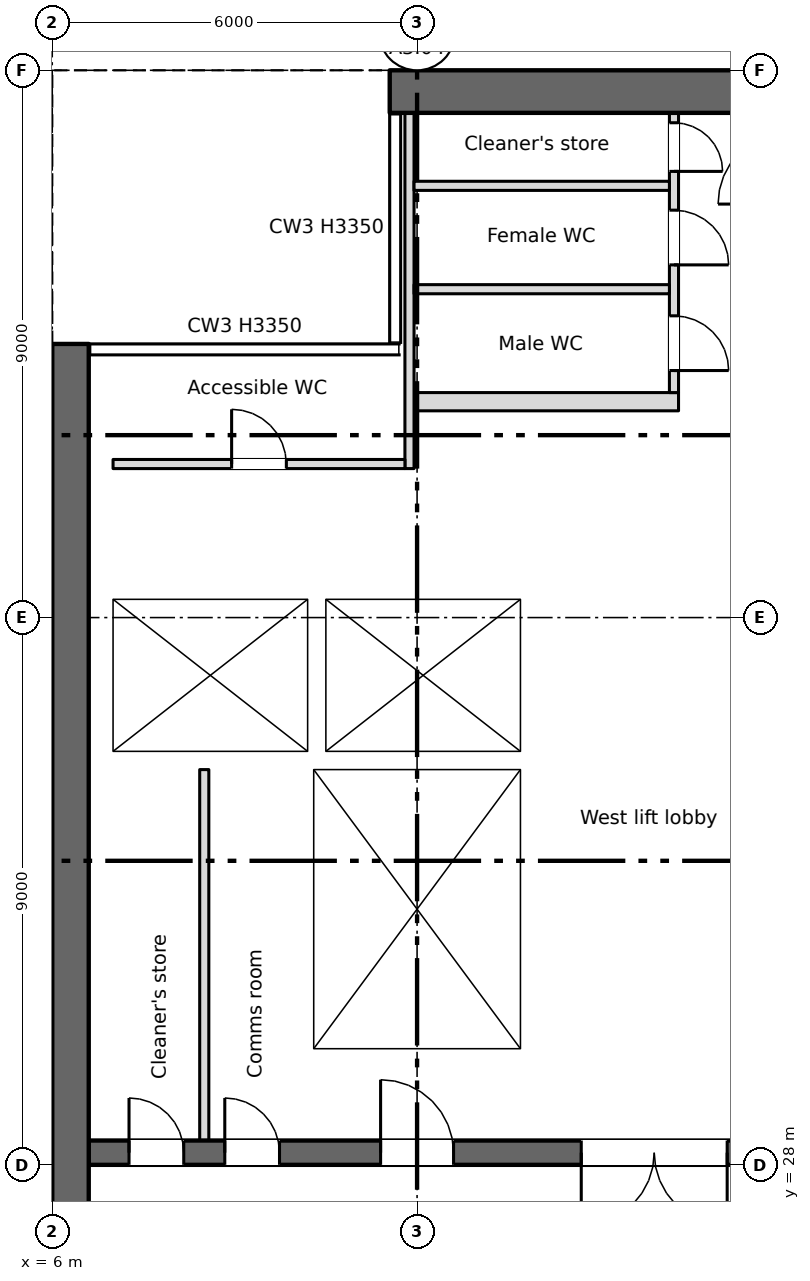
"""IFC4 building model, lengths in metres.
Left out: names, types, materials, properties, quantities, classifications, styles, units other than length and angle.
Written with IfcOpenShell. Run it as: python <this file> out.ifc"""

import sys

from ifc_helpers import new_model, si_unit, direction, frame, frame_2d, origin, place, context, subcontext, project, spatial, rectangle, extrude, element, fill, save


model = new_model("IFC4")
c1 = context("Model", 3, precision=1e-05, world=origin(), true_north=direction((0.0, 1.0)))
c2 = subcontext(c1, "Body", "Model", "MODEL_VIEW")
j1 = project(units=[si_unit("LENGTHUNIT", "METRE"), si_unit("PLANEANGLEUNIT", "RADIAN")], contexts=[c1])
p1 = place(None, origin())
s1 = spatial("IfcSite", under=j1, at=p1, CompositionType="ELEMENT")
p2 = place(p1, origin())
s2 = spatial("IfcBuilding", under=s1, at=p2, CompositionType="ELEMENT")
p3 = place(p2, frame((0.0, 0.0, 208.0)))
s3 = spatial("IfcBuildingStorey", under=s2, at=p3, CompositionType="ELEMENT", Elevation=208.0)
p4 = place(p3, frame((6.3, 7.5, 0.0), z_axis=(0.0, 0.0, 1.0), x_axis=(0.0, 1.0, 0.0)))
e1 = element("IfcWall", 1, at=p4, inside=s3, PredefinedType="SHEAR", context=c2, shape_type="SweptSolid", body=[
    extrude(rectangle(XDim=34.0, YDim=0.6, at=frame_2d((17.0, 0.0))), origin(), (0.0, 0.0, 1.0), 3.35),
])
p5 = place(p4, frame((1.2, 0.0, 0.6)))
e2 = element("IfcOpeningElement", 2, at=p5, cuts=e1, PredefinedType="OPENING", context=c2, shape_type="SweptSolid", body=[
    extrude(rectangle(XDim=0.6, YDim=2.4, at=frame_2d((0.3, 1.2))), frame((0.0, 0.31, 0.0), z_axis=(0.0, -1.0, 0.0), x_axis=(1.0, 0.0, 0.0)), (0.0, 0.0, 1.0), 0.62),
])
p6 = place(p4, frame((7.2, 0.0, 0.6)))
e3 = element("IfcOpeningElement", 3, at=p6, cuts=e1, PredefinedType="OPENING", context=c2, shape_type="SweptSolid", body=[
    extrude(rectangle(XDim=0.6, YDim=2.4, at=frame_2d((0.3, 1.2))), frame((0.0, 0.31, 0.0), z_axis=(0.0, -1.0, 0.0), x_axis=(1.0, 0.0, 0.0)), (0.0, 0.0, 1.0), 0.62),
])
p7 = place(p4, frame((13.2, 0.0, 0.6)))
e4 = element("IfcOpeningElement", 4, at=p7, cuts=e1, PredefinedType="OPENING", context=c2, shape_type="SweptSolid", body=[
    extrude(rectangle(XDim=0.6, YDim=2.4, at=frame_2d((0.3, 1.2))), frame((0.0, 0.31, 0.0), z_axis=(0.0, -1.0, 0.0), x_axis=(1.0, 0.0, 0.0)), (0.0, 0.0, 1.0), 0.62),
])
p8 = place(p4, frame((19.2, 0.0, 0.6)))
e5 = element("IfcOpeningElement", 5, at=p8, cuts=e1, PredefinedType="OPENING", context=c2, shape_type="SweptSolid", body=[
    extrude(rectangle(XDim=0.6, YDim=2.4, at=frame_2d((0.3, 1.2))), frame((0.0, 0.31, 0.0), z_axis=(0.0, -1.0, 0.0), x_axis=(1.0, 0.0, 0.0)), (0.0, 0.0, 1.0), 0.62),
])
p9 = place(p3, frame((11.55, 45.65, 0.0), z_axis=(0.0, 0.0, 1.0), x_axis=(1.0, 0.0, 0.0)))
e6 = element("IfcWall", 6, at=p9, inside=s3, PredefinedType="SHEAR", context=c2, shape_type="SweptSolid", body=[
    extrude(rectangle(XDim=54.9, YDim=0.7, at=frame_2d((27.45, 0.0))), origin(), (0.0, 0.0, 1.0), 3.35),
])
p10 = place(p3, frame((6.6, 28.2, 0.0), z_axis=(0.0, 0.0, 1.0), x_axis=(1.0, 0.0, 0.0)))
e7 = element("IfcWall", 7, at=p10, inside=s3, PredefinedType="SHEAR", context=c2, shape_type="SweptSolid", body=[
    extrude(rectangle(XDim=57.9, YDim=0.4, at=frame_2d((28.95, 0.0))), origin(), (0.0, 0.0, 1.0), 3.35),
])
p11 = place(p10, frame((12.663, 0.0, 0.0)))
e8 = element("IfcOpeningElement", 8, at=p11, cuts=e7, PredefinedType="OPENING", context=c2, shape_type="SweptSolid", body=[
    extrude(rectangle(XDim=0.9, YDim=2.1, at=frame_2d((0.45, 1.05))), frame((0.0, 0.21, 0.0), z_axis=(0.0, -1.0, 0.0), x_axis=(1.0, 0.0, 0.0)), (0.0, 0.0, 1.0), 0.42),
])
p12 = place(p10, frame((15.238, 0.0, 0.0)))
e9 = element("IfcOpeningElement", 9, at=p12, cuts=e7, PredefinedType="OPENING", context=c2, shape_type="SweptSolid", body=[
    extrude(rectangle(XDim=0.9, YDim=2.1, at=frame_2d((0.45, 1.05))), frame((0.0, 0.21, 0.0), z_axis=(0.0, -1.0, 0.0), x_axis=(1.0, 0.0, 0.0)), (0.0, 0.0, 1.0), 0.42),
])
p13 = place(p10, frame((49.95, 0.0, 0.0)))
e10 = element("IfcOpeningElement", 10, at=p13, cuts=e7, PredefinedType="OPENING", context=c2, shape_type="SweptSolid", body=[
    extrude(rectangle(XDim=0.9, YDim=2.1, at=frame_2d((0.45, 1.05))), frame((0.0, 0.21, 0.0), z_axis=(0.0, -1.0, 0.0), x_axis=(1.0, 0.0, 0.0)), (0.0, 0.0, 1.0), 0.42),
])
p14 = place(p10, frame((0.663, 0.0, 0.0)))
e11 = element("IfcOpeningElement", 11, at=p14, cuts=e7, PredefinedType="OPENING", context=c2, shape_type="SweptSolid", body=[
    extrude(rectangle(XDim=0.9, YDim=2.1, at=frame_2d((0.45, 1.05))), frame((0.0, 0.21, 0.0), z_axis=(0.0, -1.0, 0.0), x_axis=(1.0, 0.0, 0.0)), (0.0, 0.0, 1.0), 0.42),
])
p15 = place(p10, frame((2.238, 0.0, 0.0)))
e12 = element("IfcOpeningElement", 12, at=p15, cuts=e7, PredefinedType="OPENING", context=c2, shape_type="SweptSolid", body=[
    extrude(rectangle(XDim=0.9, YDim=2.1, at=frame_2d((0.45, 1.05))), frame((0.0, 0.21, 0.0), z_axis=(0.0, -1.0, 0.0), x_axis=(1.0, 0.0, 0.0)), (0.0, 0.0, 1.0), 0.42),
])
p16 = place(p10, frame((4.8, 0.0, 0.0)))
e13 = element("IfcOpeningElement", 13, at=p16, cuts=e7, PredefinedType="OPENING", context=c2, shape_type="SweptSolid", body=[
    extrude(rectangle(XDim=1.2, YDim=2.1, at=frame_2d((0.6, 1.05))), frame((0.0, 0.21, 0.0), z_axis=(0.0, -1.0, 0.0), x_axis=(1.0, 0.0, 0.0)), (0.0, 0.0, 1.0), 0.42),
])
p17 = place(p10, frame((31.8, 0.0, 0.0)))
e14 = element("IfcOpeningElement", 14, at=p17, cuts=e7, PredefinedType="OPENING", context=c2, shape_type="SweptSolid", body=[
    extrude(rectangle(XDim=1.2, YDim=2.1, at=frame_2d((0.6, 1.05))), frame((0.0, 0.21, 0.0), z_axis=(0.0, -1.0, 0.0), x_axis=(1.0, 0.0, 0.0)), (0.0, 0.0, 1.0), 0.42),
])
p18 = place(p10, frame((55.3, 0.0, 0.0)))
e15 = element("IfcOpeningElement", 15, at=p18, cuts=e7, PredefinedType="OPENING", context=c2, shape_type="SweptSolid", body=[
    extrude(rectangle(XDim=1.2, YDim=2.1, at=frame_2d((0.6, 1.05))), frame((0.0, 0.21, 0.0), z_axis=(0.0, -1.0, 0.0), x_axis=(1.0, 0.0, 0.0)), (0.0, 0.0, 1.0), 0.42),
])
p19 = place(p10, frame((21.8, 0.0, 0.0)))
e16 = element("IfcOpeningElement", 16, at=p19, cuts=e7, PredefinedType="OPENING", context=c2, shape_type="SweptSolid", body=[
    extrude(rectangle(XDim=1.2, YDim=2.1, at=frame_2d((0.6, 1.05))), frame((0.0, 0.21, 0.0), z_axis=(0.0, -1.0, 0.0), x_axis=(1.0, 0.0, 0.0)), (0.0, 0.0, 1.0), 0.42),
])
p20 = place(p10, frame((41.8, 0.0, 0.0)))
e17 = element("IfcOpeningElement", 17, at=p20, cuts=e7, PredefinedType="OPENING", context=c2, shape_type="SweptSolid", body=[
    extrude(rectangle(XDim=1.2, YDim=2.1, at=frame_2d((0.6, 1.05))), frame((0.0, 0.21, 0.0), z_axis=(0.0, -1.0, 0.0), x_axis=(1.0, 0.0, 0.0)), (0.0, 0.0, 1.0), 0.42),
])
p21 = place(p10, frame((24.95, 0.0, 0.0)))
e18 = element("IfcOpeningElement", 18, at=p21, cuts=e7, PredefinedType="OPENING", context=c2, shape_type="SweptSolid", body=[
    extrude(rectangle(XDim=2.4, YDim=2.1, at=frame_2d((1.2, 1.05))), frame((0.0, 0.21, 0.0), z_axis=(0.0, -1.0, 0.0), x_axis=(1.0, 0.0, 0.0)), (0.0, 0.0, 1.0), 0.42),
])
p22 = place(p10, frame((37.45, 0.0, 0.0)))
e19 = element("IfcOpeningElement", 19, at=p22, cuts=e7, PredefinedType="OPENING", context=c2, shape_type="SweptSolid", body=[
    extrude(rectangle(XDim=2.4, YDim=2.1, at=frame_2d((1.2, 1.05))), frame((0.0, 0.21, 0.0), z_axis=(0.0, -1.0, 0.0), x_axis=(1.0, 0.0, 0.0)), (0.0, 0.0, 1.0), 0.42),
])
p23 = place(p10, frame((8.1, 0.0, 0.0)))
e20 = element("IfcOpeningElement", 20, at=p23, cuts=e7, PredefinedType="OPENING", context=c2, shape_type="SweptSolid", body=[
    extrude(rectangle(XDim=2.4, YDim=2.1, at=frame_2d((1.2, 1.05))), frame((0.0, 0.21, 0.0), z_axis=(0.0, -1.0, 0.0), x_axis=(1.0, 0.0, 0.0)), (0.0, 0.0, 1.0), 0.42),
])
p24 = place(p10, frame((28.95, 0.0, 0.0)))
e21 = element("IfcOpeningElement", 21, at=p24, cuts=e7, PredefinedType="OPENING", context=c2, shape_type="SweptSolid", body=[
    extrude(rectangle(XDim=0.9, YDim=2.1, at=frame_2d((0.45, 1.05))), frame((0.0, 0.21, 0.0), z_axis=(0.0, -1.0, 0.0), x_axis=(1.0, 0.0, 0.0)), (0.0, 0.0, 1.0), 0.42),
])
p25 = place(p10, frame((34.95, 0.0, 0.0)))
e22 = element("IfcOpeningElement", 22, at=p25, cuts=e7, PredefinedType="OPENING", context=c2, shape_type="SweptSolid", body=[
    extrude(rectangle(XDim=0.9, YDim=2.1, at=frame_2d((0.45, 1.05))), frame((0.0, 0.21, 0.0), z_axis=(0.0, -1.0, 0.0), x_axis=(1.0, 0.0, 0.0)), (0.0, 0.0, 1.0), 0.42),
])
p26 = place(p3, frame((6.8, 28.4, 0.0), z_axis=(0.0, 0.0, 1.0), x_axis=(0.0, 1.0, 0.0)))
e23 = element("IfcWall", 23, at=p26, inside=s3, PredefinedType="SHEAR", context=c2, shape_type="SweptSolid", body=[
    extrude(rectangle(XDim=12.85, YDim=0.4, at=frame_2d((6.425, 0.0))), origin(), (0.0, 0.0, 1.0), 3.35),
])
for number, where, z_axis, x_axis in (
    (24, (10.15, 28.4, 0.0), (0.0, 0.0, 1.0), (0.0, 1.0, 0.0)),
    (25, (13.85, 28.4, 0.0), (0.0, 0.0, 1.0), (0.0, 1.0, 0.0)),
):
    element("IfcWall", number, at=place(p3, frame(where, z_axis=z_axis, x_axis=x_axis)), inside=s3, PredefinedType="SHEAR", context=c2, shape_type="SweptSolid", body=[
        extrude(rectangle(XDim=6.1, YDim=0.3, at=frame_2d((3.05, 0.0))), origin(), (0.0, 0.0, 1.0), 3.35),
    ])
for number, where, z_axis, x_axis in (
    (26, (7.0, 34.65, 0.0), (0.0, 0.0, 1.0), (1.0, 0.0, 0.0)),
    (27, (7.0, 37.45, 0.0), (0.0, 0.0, 1.0), (1.0, 0.0, 0.0)),
):
    element("IfcWall", number, at=place(p3, frame(where, z_axis=z_axis, x_axis=x_axis)), inside=s3, PredefinedType="SHEAR", context=c2, shape_type="SweptSolid", body=[
        extrude(rectangle(XDim=7.0, YDim=0.3, at=frame_2d((3.5, 0.0))), origin(), (0.0, 0.0, 1.0), 3.35),
    ])
p27 = place(p3, frame((13.85, 34.8, 0.0), z_axis=(0.0, 0.0, 1.0), x_axis=(0.0, 1.0, 0.0)))
e28 = element("IfcWall", 28, at=p27, inside=s3, PredefinedType="SHEAR", context=c2, shape_type="SweptSolid", body=[
    extrude(rectangle(XDim=2.5, YDim=0.3, at=frame_2d((1.25, 0.0))), origin(), (0.0, 0.0, 1.0), 3.35),
])
p28 = place(p3, frame((11.95, 40.55, 0.0), z_axis=(0.0, 0.0, 1.0), x_axis=(1.0, 0.0, 0.0)))
e29 = element("IfcWall", 29, at=p28, inside=s3, PredefinedType="PARTITIONING", context=c2, shape_type="SweptSolid", body=[
    extrude(rectangle(XDim=4.35, YDim=0.3, at=frame_2d((2.175, 0.0))), origin(), (0.0, 0.0, 1.0), 3.35),
])
p29 = place(p3, frame((10.35, 34.8, 0.0), z_axis=(0.0, 0.0, 1.0), x_axis=(0.0, 1.0, 0.0)))
e30 = element("IfcWall", 30, at=p29, inside=s3, PredefinedType="SHEAR", context=c2, shape_type="SweptSolid", body=[
    extrude(rectangle(XDim=2.5, YDim=0.3, at=frame_2d((1.25, 0.0))), origin(), (0.0, 0.0, 1.0), 3.35),
])
p30 = place(p3, frame((16.225, 45.3, 0.0), z_axis=(0.0, 0.0, 1.0), x_axis=(0.0, -1.0, 0.0)))
e31 = element("IfcWall", 31, at=p30, inside=s3, PredefinedType="PARTITIONING", context=c2, shape_type="SweptSolid", body=[
    extrude(rectangle(XDim=4.6, YDim=0.15, at=frame_2d((2.3, 0.0))), origin(), (0.0, 0.0, 1.0), 3.35),
])
p31 = place(p30, frame((3.337, 0.0, 0.0)))
e32 = element("IfcOpeningElement", 32, at=p31, cuts=e31, PredefinedType="OPENING", context=c2, shape_type="SweptSolid", body=[
    extrude(rectangle(XDim=0.9, YDim=2.1, at=frame_2d((0.45, 1.05))), frame((0.0, 0.085, 0.0), z_axis=(0.0, -1.0, 0.0), x_axis=(1.0, 0.0, 0.0)), (0.0, 0.0, 1.0), 0.17),
])
p32 = place(p30, frame((1.6, 0.0, 0.0)))
e33 = element("IfcOpeningElement", 33, at=p32, cuts=e31, PredefinedType="OPENING", context=c2, shape_type="SweptSolid", body=[
    extrude(rectangle(XDim=0.9, YDim=2.1, at=frame_2d((0.45, 1.05))), frame((0.0, 0.085, 0.0), z_axis=(0.0, -1.0, 0.0), x_axis=(1.0, 0.0, 0.0)), (0.0, 0.0, 1.0), 0.17),
])
p33 = place(p30, frame((0.163, 0.0, 0.0)))
e34 = element("IfcOpeningElement", 34, at=p33, cuts=e31, PredefinedType="OPENING", context=c2, shape_type="SweptSolid", body=[
    extrude(rectangle(XDim=0.8, YDim=2.1, at=frame_2d((0.4, 1.05))), frame((0.0, 0.085, 0.0), z_axis=(0.0, -1.0, 0.0), x_axis=(1.0, 0.0, 0.0)), (0.0, 0.0, 1.0), 0.17),
])
p34 = place(p3, frame((8.5, 28.4, 0.0), z_axis=(0.0, 0.0, 1.0), x_axis=(0.0, 1.0, 0.0)))
e35 = element("IfcWall", 35, at=p34, inside=s3, PredefinedType="PARTITIONING", context=c2, shape_type="SweptSolid", body=[
    extrude(rectangle(XDim=6.1, YDim=0.15, at=frame_2d((3.05, 0.0))), origin(), (0.0, 0.0, 1.0), 3.35),
])
p35 = place(p3, frame((11.875, 39.45, 0.0), z_axis=(0.0, 0.0, 1.0), x_axis=(0.0, 1.0, 0.0)))
e36 = element("IfcWall", 36, at=p35, inside=s3, PredefinedType="PARTITIONING", context=c2, shape_type="SweptSolid", body=[
    extrude(rectangle(XDim=5.85, YDim=0.15, at=frame_2d((2.925, 0.0))), origin(), (0.0, 0.0, 1.0), 3.35),
])
p36 = place(p3, frame((7.0, 39.525, 0.0), z_axis=(0.0, 0.0, 1.0), x_axis=(1.0, 0.0, 0.0)))
e37 = element("IfcWall", 37, at=p36, inside=s3, PredefinedType="PARTITIONING", context=c2, shape_type="SweptSolid", body=[
    extrude(rectangle(XDim=4.8, YDim=0.15, at=frame_2d((2.4, 0.0))), origin(), (0.0, 0.0, 1.0), 3.35),
])
p37 = place(p36, frame((1.95, 0.0, 0.0)))
e38 = element("IfcOpeningElement", 38, at=p37, cuts=e37, PredefinedType="OPENING", context=c2, shape_type="SweptSolid", body=[
    extrude(rectangle(XDim=0.9, YDim=2.1, at=frame_2d((0.45, 1.05))), frame((0.0, 0.085, 0.0), z_axis=(0.0, -1.0, 0.0), x_axis=(1.0, 0.0, 0.0)), (0.0, 0.0, 1.0), 0.17),
])
for number, where, z_axis, x_axis in (
    (39, (11.95, 42.4, 0.0), (0.0, 0.0, 1.0), (1.0, 0.0, 0.0)),
    (40, (11.95, 44.1, 0.0), (0.0, 0.0, 1.0), (1.0, 0.0, 0.0)),
):
    element("IfcWall", number, at=place(p3, frame(where, z_axis=z_axis, x_axis=x_axis)), inside=s3, PredefinedType="PARTITIONING", context=c2, shape_type="SweptSolid", body=[
        extrude(rectangle(XDim=4.2, YDim=0.15, at=frame_2d((2.1, 0.0))), origin(), (0.0, 0.0, 1.0), 3.35),
    ])
p38 = place(p14, origin())
e41 = element("IfcDoor", 41, at=p38, inside=s3, OperationType="SINGLE_SWING_LEFT", PredefinedType="DOOR", context=c2, shape_type="SweptSolid", body=[
    extrude(rectangle(XDim=0.9, YDim=2.1, at=frame_2d((0.45, 1.05))), frame((0.0, 0.025, 0.0), z_axis=(0.0, -1.0, 0.0), x_axis=(1.0, 0.0, 0.0)), (0.0, 0.0, 1.0), 0.05),
])
fill(e11, e41)
p39 = place(p15, origin())
e42 = element("IfcDoor", 42, at=p39, inside=s3, OperationType="SINGLE_SWING_LEFT", PredefinedType="DOOR", context=c2, shape_type="SweptSolid", body=[
    extrude(rectangle(XDim=0.9, YDim=2.1, at=frame_2d((0.45, 1.05))), frame((0.0, 0.025, 0.0), z_axis=(0.0, -1.0, 0.0), x_axis=(1.0, 0.0, 0.0)), (0.0, 0.0, 1.0), 0.05),
])
fill(e12, e42)
p40 = place(p37, origin())
e43 = element("IfcDoor", 43, at=p40, inside=s3, OperationType="SINGLE_SWING_LEFT", PredefinedType="DOOR", context=c2, shape_type="SweptSolid", body=[
    extrude(rectangle(XDim=0.9, YDim=2.1, at=frame_2d((0.45, 1.05))), frame((0.0, 0.025, 0.0), z_axis=(0.0, -1.0, 0.0), x_axis=(1.0, 0.0, 0.0)), (0.0, 0.0, 1.0), 0.05),
])
fill(e38, e43)
p41 = place(p31, origin())
e44 = element("IfcDoor", 44, at=p41, inside=s3, OperationType="SINGLE_SWING_RIGHT", PredefinedType="DOOR", context=c2, shape_type="SweptSolid", body=[
    extrude(rectangle(XDim=0.9, YDim=2.1, at=frame_2d((0.45, 1.05))), frame((0.0, 0.025, 0.0), z_axis=(0.0, -1.0, 0.0), x_axis=(1.0, 0.0, 0.0)), (0.0, 0.0, 1.0), 0.05),
])
fill(e32, e44)
p42 = place(p32, origin())
e45 = element("IfcDoor", 45, at=p42, inside=s3, OperationType="SINGLE_SWING_RIGHT", PredefinedType="DOOR", context=c2, shape_type="SweptSolid", body=[
    extrude(rectangle(XDim=0.9, YDim=2.1, at=frame_2d((0.45, 1.05))), frame((0.0, 0.025, 0.0), z_axis=(0.0, -1.0, 0.0), x_axis=(1.0, 0.0, 0.0)), (0.0, 0.0, 1.0), 0.05),
])
fill(e33, e45)
p43 = place(p33, origin())
e46 = element("IfcDoor", 46, at=p43, inside=s3, OperationType="SINGLE_SWING_RIGHT", PredefinedType="DOOR", context=c2, shape_type="SweptSolid", body=[
    extrude(rectangle(XDim=0.8, YDim=2.1, at=frame_2d((0.4, 1.05))), frame((0.0, 0.025, 0.0), z_axis=(0.0, -1.0, 0.0), x_axis=(1.0, 0.0, 0.0)), (0.0, 0.0, 1.0), 0.05),
])
fill(e34, e46)
p44 = place(p16, origin())
e47 = element("IfcDoor", 47, at=p44, inside=s3, OperationType="SINGLE_SWING_LEFT", PredefinedType="DOOR", context=c2, shape_type="SweptSolid", body=[
    extrude(rectangle(XDim=1.2, YDim=2.1, at=frame_2d((0.6, 1.05))), frame((0.0, 0.025, 0.0), z_axis=(0.0, -1.0, 0.0), x_axis=(1.0, 0.0, 0.0)), (0.0, 0.0, 1.0), 0.05),
])
fill(e13, e47)
p45 = place(p23, origin())
e48 = element("IfcDoor", 48, at=p45, inside=s3, OperationType="DOUBLE_DOOR_SINGLE_SWING", PredefinedType="DOOR", context=c2, shape_type="SweptSolid", body=[
    extrude(rectangle(XDim=2.4, YDim=2.1, at=frame_2d((1.2, 1.05))), frame((0.0, 0.025, 0.0), z_axis=(0.0, -1.0, 0.0), x_axis=(1.0, 0.0, 0.0)), (0.0, 0.0, 1.0), 0.05),
])
fill(e20, e48)
save(model, sys.argv[1])
